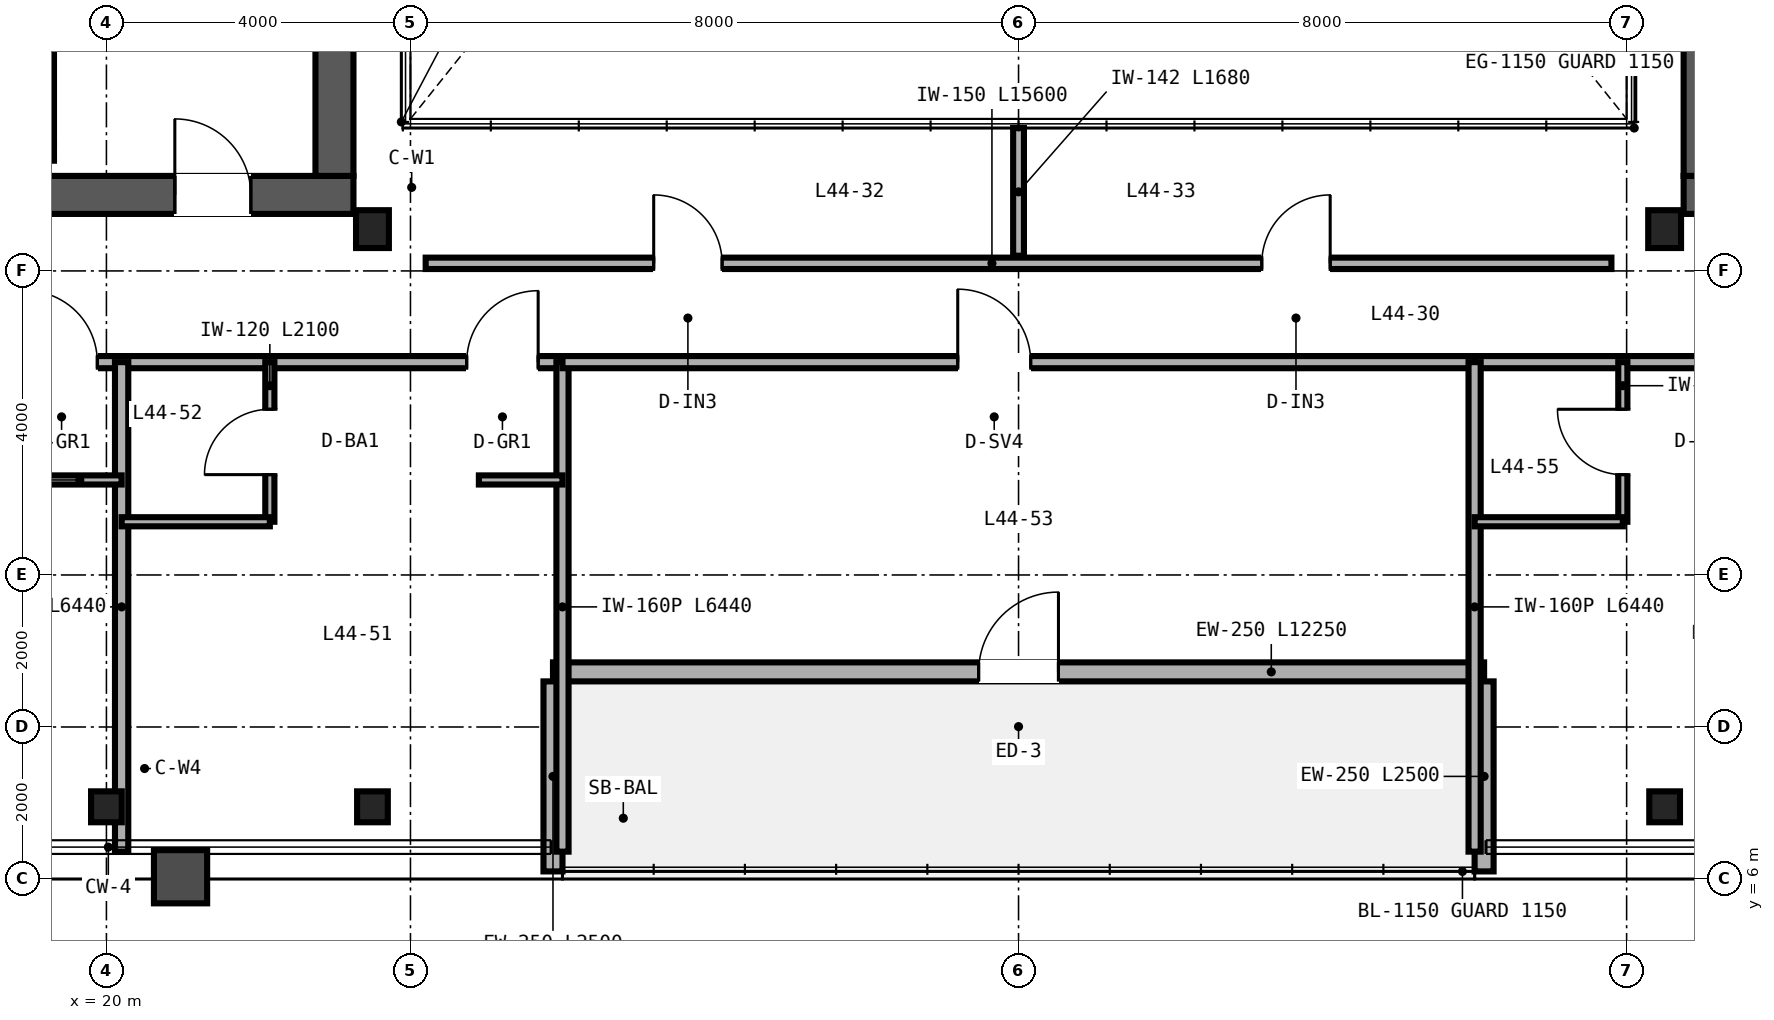
"""IFC4 building model, lengths in metres.
Left out: names, types, materials, properties, quantities, classifications, styles, units other than length and angle.
Written with IfcOpenShell. Run it as: python <this file> out.ifc"""

import sys

from ifc_helpers import new_model, si_unit, direction, frame, frame_2d, origin, origin_2d, place, context, subcontext, project, spatial, rectangle, i_section, extrude, source, transform, mapped, element, fill, save


model = new_model("IFC4")
c1 = context("Model", 3, precision=1e-05, world=origin(), true_north=direction((0.0, 1.0)))
c2 = subcontext(c1, "Body", "Model", "MODEL_VIEW")
j1 = project(units=[si_unit("LENGTHUNIT", "METRE"), si_unit("PLANEANGLEUNIT", "RADIAN")], contexts=[c1])
p1 = place(None, origin())
s1 = spatial("IfcSite", under=j1, at=p1, CompositionType="ELEMENT")
p2 = place(p1, origin())
s2 = spatial("IfcBuilding", under=s1, at=p2, CompositionType="ELEMENT")
p3 = place(p2, frame((0.0, 0.0, 177.6)))
s3 = spatial("IfcBuildingStorey", under=s2, at=p3, CompositionType="ELEMENT", Elevation=177.6)
p4 = place(p3, frame((10.75, 15.0, 0.0), z_axis=(0.0, 0.0, 1.0), x_axis=(1.0, 0.0, 0.0)))
e1 = element("IfcWall", 1, at=p4, inside=s3, PredefinedType="SHEAR", context=c2, shape_type="SweptSolid", body=[
    extrude(rectangle(XDim=12.5, YDim=0.5, at=frame_2d((6.25, 0.0))), origin(), (0.0, 0.0, 1.0), 3.37),
])
p5 = place(p4, frame((10.15, 0.0, 0.0)))
e2 = element("IfcOpeningElement", 2, at=p5, cuts=e1, PredefinedType="OPENING", context=c2, shape_type="SweptSolid", body=[
    extrude(rectangle(XDim=1.0, YDim=2.15, at=frame_2d((0.5, 1.075))), frame((0.0, 0.26, 0.0), z_axis=(0.0, -1.0, 0.0), x_axis=(1.0, 0.0, 0.0)), (0.0, 0.0, 1.0), 0.52),
])
p6 = place(p3, frame((23.0, 15.25, 0.0), z_axis=(0.0, 0.0, 1.0), x_axis=(0.0, 1.0, 0.0)))
e3 = element("IfcWall", 3, at=p6, inside=s3, PredefinedType="SHEAR", context=c2, shape_type="SweptSolid", body=[
    extrude(rectangle(XDim=21.5, YDim=0.5, at=frame_2d((10.75, 0.0))), origin(), (0.0, 0.0, 1.0), 3.37),
])
p7 = place(p3, frame((40.75, 15.0, 0.0), z_axis=(0.0, 0.0, 1.0), x_axis=(1.0, 0.0, 0.0)))
e4 = element("IfcWall", 4, at=p7, inside=s3, PredefinedType="SHEAR", context=c2, shape_type="SweptSolid", body=[
    extrude(rectangle(XDim=12.5, YDim=0.5, at=frame_2d((6.25, 0.0))), origin(), (0.0, 0.0, 1.0), 3.37),
])
p8 = place(p7, frame((4.35, 0.0, 0.0)))
e5 = element("IfcOpeningElement", 5, at=p8, cuts=e4, PredefinedType="OPENING", context=c2, shape_type="SweptSolid", body=[
    extrude(rectangle(XDim=1.0, YDim=2.15, at=frame_2d((0.5, 1.075))), frame((0.0, 0.26, 0.0), z_axis=(0.0, -1.0, 0.0), x_axis=(1.0, 0.0, 0.0)), (0.0, 0.0, 1.0), 0.52),
])
p9 = place(p3, frame((41.0, 15.25, 0.0), z_axis=(0.0, 0.0, 1.0), x_axis=(0.0, 1.0, 0.0)))
e6 = element("IfcWall", 6, at=p9, inside=s3, PredefinedType="SHEAR", context=c2, shape_type="SweptSolid", body=[
    extrude(rectangle(XDim=21.5, YDim=0.5, at=frame_2d((10.75, 0.0))), origin(), (0.0, 0.0, 1.0), 3.37),
])
p10 = place(p3, frame((11.25, 15.56, 0.0), z_axis=(0.0, 0.0, 1.0), x_axis=(1.0, 0.0, 0.0)))
e7 = element("IfcWall", 7, at=p10, inside=s3, PredefinedType="SHEAR", context=c2, shape_type="SweptSolid", body=[
    extrude(rectangle(XDim=8.06, YDim=0.22, at=frame_2d((4.03, 0.0))), origin(), (0.0, 0.0, 1.0), 3.4),
])
p11 = place(p3, frame((19.2, 15.67, 0.0), z_axis=(0.0, 0.0, 1.0), x_axis=(0.0, 1.0, 0.0)))
e8 = element("IfcWall", 8, at=p11, inside=s3, PredefinedType="SHEAR", context=c2, shape_type="SweptSolid", body=[
    extrude(rectangle(XDim=3.28, YDim=0.22, at=frame_2d((1.64, 0.0))), origin(), (0.0, 0.0, 1.0), 3.4),
])
m1 = source(origin(), c2, "Body", "SweptSolid", [
    extrude(i_section(OverallWidth=0.432, OverallDepth=0.498, WebThickness=0.056, FlangeThickness=0.089, FilletRadius=0.025, at=origin_2d()), origin(), (0.0, 0.0, 1.0), 3.37),
])
for number, where, z_axis, x_axis in (
    (9, (23.5, 14.55, 0.0), (0.0, 0.0, 1.0), (1.0, 0.0, 0.0)),
    (10, (40.5, 14.55, 0.0), (0.0, 0.0, 1.0), (1.0, 0.0, 0.0)),
):
    element("IfcColumn", number, at=place(p3, frame(where, z_axis=z_axis, x_axis=x_axis)), inside=s3, PredefinedType="COLUMN", context=c2, shape_type="MappedRepresentation", body=[
        mapped(m1, transform((0.0, 0.0, 0.0), scale=1.0)),
    ])
m2 = source(origin(), c2, "Body", "SweptSolid", [
    extrude(i_section(OverallWidth=0.404, OverallDepth=0.407, WebThickness=0.027, FlangeThickness=0.044, FilletRadius=0.025, at=origin_2d()), origin(), (0.0, 0.0, 1.0), 3.37),
])
for number, where, z_axis, x_axis in (
    (11, (20.0, 6.95, 0.0), (0.0, 0.0, 1.0), (1.0, 0.0, 0.0)),
    (12, (23.5, 6.95, 0.0), (0.0, 0.0, 1.0), (1.0, 0.0, 0.0)),
    (13, (40.5, 6.95, 0.0), (0.0, 0.0, 1.0), (1.0, 0.0, 0.0)),
):
    element("IfcColumn", number, at=place(p3, frame(where, z_axis=z_axis, x_axis=x_axis)), inside=s3, PredefinedType="COLUMN", context=c2, shape_type="MappedRepresentation", body=[
        mapped(m2, transform((0.0, 0.0, 0.0), scale=1.0)),
    ])
p12 = place(p3, frame((25.875, 8.725, 0.0), z_axis=(0.0, 0.0, 1.0), x_axis=(1.0, 0.0, 0.0)))
e14 = element("IfcWall", 14, at=p12, inside=s3, PredefinedType="SOLIDWALL", context=c2, shape_type="SweptSolid", body=[
    extrude(rectangle(XDim=12.25, YDim=0.25, at=frame_2d((6.125, 0.0))), origin(), (0.0, 0.0, 1.0), 3.37),
])
p13 = place(p12, frame((5.6, 0.0, 0.0)))
e15 = element("IfcOpeningElement", 15, at=p13, cuts=e14, PredefinedType="OPENING", context=c2, shape_type="SweptSolid", body=[
    extrude(rectangle(XDim=1.05, YDim=2.15, at=frame_2d((0.525, 1.075))), frame((0.0, 0.135, 0.0), z_axis=(0.0, -1.0, 0.0), x_axis=(1.0, 0.0, 0.0)), (0.0, 0.0, 1.0), 0.27),
])
for number, where, z_axis, x_axis in (
    (16, (25.875, 6.1, 0.0), (0.0, 0.0, 1.0), (0.0, 1.0, 0.0)),
    (17, (38.125, 6.1, 0.0), (0.0, 0.0, 1.0), (0.0, 1.0, 0.0)),
):
    element("IfcWall", number, at=place(p3, frame(where, z_axis=z_axis, x_axis=x_axis)), inside=s3, PredefinedType="SOLIDWALL", context=c2, shape_type="SweptSolid", body=[
        extrude(rectangle(XDim=2.5, YDim=0.25, at=frame_2d((1.25, 0.0))), origin(), (0.0, 0.0, 1.0), 2.443),
    ])
p14 = place(p3, frame((24.2, 14.1, 0.0), z_axis=(0.0, 0.0, 1.0), x_axis=(1.0, 0.0, 0.0)))
e18 = element("IfcWall", 18, at=p14, inside=s3, PredefinedType="PARTITIONING", context=c2, shape_type="SweptSolid", body=[
    extrude(rectangle(XDim=15.6, YDim=0.15, at=frame_2d((7.8, 0.0))), origin(), (0.0, 0.0, 1.0), 3.37),
])
p15 = place(p14, frame((3.0, 0.0, 0.0)))
e19 = element("IfcOpeningElement", 19, at=p15, cuts=e18, PredefinedType="OPENING", context=c2, shape_type="SweptSolid", body=[
    extrude(rectangle(XDim=0.9, YDim=2.15, at=frame_2d((0.45, 1.075))), frame((0.0, 0.085, 0.0), z_axis=(0.0, -1.0, 0.0), x_axis=(1.0, 0.0, 0.0)), (0.0, 0.0, 1.0), 0.17),
])
p16 = place(p14, frame((11.0, 0.0, 0.0)))
e20 = element("IfcOpeningElement", 20, at=p16, cuts=e18, PredefinedType="OPENING", context=c2, shape_type="SweptSolid", body=[
    extrude(rectangle(XDim=0.9, YDim=2.15, at=frame_2d((0.45, 1.075))), frame((0.0, 0.085, 0.0), z_axis=(0.0, -1.0, 0.0), x_axis=(1.0, 0.0, 0.0)), (0.0, 0.0, 1.0), 0.17),
])
p17 = place(p3, frame((32.0, 14.2, 0.0), z_axis=(0.0, 0.0, 1.0), x_axis=(0.0, 1.0, 0.0)))
e21 = element("IfcWall", 21, at=p17, inside=s3, PredefinedType="PARTITIONING", context=c2, shape_type="SweptSolid", body=[
    extrude(rectangle(XDim=1.68, YDim=0.142, at=frame_2d((0.84, 0.0))), origin(), (0.0, 0.0, 1.0), 3.37),
])
p18 = place(p3, frame((14.0, 12.8, 0.0), z_axis=(0.0, 0.0, 1.0), x_axis=(1.0, 0.0, 0.0)))
e22 = element("IfcWall", 22, at=p18, inside=s3, PredefinedType="PARTITIONING", context=c2, shape_type="SweptSolid", body=[
    extrude(rectangle(XDim=12.0, YDim=0.16, at=frame_2d((6.0, 0.0))), origin(), (0.0, 0.0, 1.0), 2.913),
])
p19 = place(p18, frame((4.94, 0.0, 0.0)))
e23 = element("IfcOpeningElement", 23, at=p19, cuts=e22, PredefinedType="OPENING", context=c2, shape_type="SweptSolid", body=[
    extrude(rectangle(XDim=0.94, YDim=2.15, at=frame_2d((0.47, 1.075))), frame((0.0, 0.09, 0.0), z_axis=(0.0, -1.0, 0.0), x_axis=(1.0, 0.0, 0.0)), (0.0, 0.0, 1.0), 0.18),
])
p20 = place(p18, frame((10.74, 0.0, 0.0)))
e24 = element("IfcOpeningElement", 24, at=p20, cuts=e22, PredefinedType="OPENING", context=c2, shape_type="SweptSolid", body=[
    extrude(rectangle(XDim=0.94, YDim=2.15, at=frame_2d((0.47, 1.075))), frame((0.0, 0.09, 0.0), z_axis=(0.0, -1.0, 0.0), x_axis=(1.0, 0.0, 0.0)), (0.0, 0.0, 1.0), 0.18),
])
p21 = place(p3, frame((26.0, 6.36, 0.0), z_axis=(0.0, 0.0, 1.0), x_axis=(0.0, 1.0, 0.0)))
e25 = element("IfcWall", 25, at=p21, inside=s3, PredefinedType="PARTITIONING", context=c2, shape_type="SweptSolid", body=[
    extrude(rectangle(XDim=6.44, YDim=0.16, at=frame_2d((3.22, 0.0))), origin(), (0.0, 0.0, 1.0), 2.443),
])
p22 = place(p3, frame((20.2, 6.36, 0.0), z_axis=(0.0, 0.0, 1.0), x_axis=(0.0, 1.0, 0.0)))
e26 = element("IfcWall", 26, at=p22, inside=s3, PredefinedType="PARTITIONING", context=c2, shape_type="SweptSolid", body=[
    extrude(rectangle(XDim=6.44, YDim=0.175, at=frame_2d((3.22, 0.0))), origin(), (0.0, 0.0, 1.0), 2.677),
])
p23 = place(p3, frame((19.1, 11.25, 0.0), z_axis=(0.0, 0.0, 1.0), x_axis=(1.0, 0.0, 0.0)))
e27 = element("IfcWall", 27, at=p23, inside=s3, PredefinedType="PARTITIONING", context=c2, shape_type="SweptSolid", body=[
    extrude(rectangle(XDim=1.1, YDim=0.12, at=frame_2d((0.55, 0.0))), origin(), (0.0, 0.0, 1.0), 3.37),
])
p24 = place(p3, frame((22.15, 10.7, 0.0), z_axis=(0.0, 0.0, 1.0), x_axis=(0.0, 1.0, 0.0)))
e28 = element("IfcWall", 28, at=p24, inside=s3, PredefinedType="PARTITIONING", context=c2, shape_type="SweptSolid", body=[
    extrude(rectangle(XDim=2.1, YDim=0.12, at=frame_2d((1.05, 0.0))), origin(), (0.0, 0.0, 1.0), 3.37),
])
p25 = place(p24, frame((0.62, 0.0, 0.0)))
e29 = element("IfcOpeningElement", 29, at=p25, cuts=e28, PredefinedType="OPENING", context=c2, shape_type="SweptSolid", body=[
    extrude(rectangle(XDim=0.86, YDim=2.1, at=frame_2d((0.43, 1.05))), frame((0.0, 0.07, 0.0), z_axis=(0.0, -1.0, 0.0), x_axis=(1.0, 0.0, 0.0)), (0.0, 0.0, 1.0), 0.14),
])
p26 = place(p3, frame((20.2, 10.7, 0.0), z_axis=(0.0, 0.0, 1.0), x_axis=(1.0, 0.0, 0.0)))
e30 = element("IfcWall", 30, at=p26, inside=s3, PredefinedType="PARTITIONING", context=c2, shape_type="SweptSolid", body=[
    extrude(rectangle(XDim=1.95, YDim=0.12, at=frame_2d((0.975, 0.0))), origin(), (0.0, 0.0, 1.0), 3.37),
])
p27 = place(p3, frame((24.9, 11.25, 0.0), z_axis=(0.0, 0.0, 1.0), x_axis=(1.0, 0.0, 0.0)))
e31 = element("IfcWall", 31, at=p27, inside=s3, PredefinedType="PARTITIONING", context=c2, shape_type="SweptSolid", body=[
    extrude(rectangle(XDim=1.1, YDim=0.12, at=frame_2d((0.55, 0.0))), origin(), (0.0, 0.0, 1.0), 3.37),
])
p28 = place(p3, frame((26.0, 12.8, 0.0), z_axis=(0.0, 0.0, 1.0), x_axis=(1.0, 0.0, 0.0)))
e32 = element("IfcWall", 32, at=p28, inside=s3, PredefinedType="PARTITIONING", context=c2, shape_type="SweptSolid", body=[
    extrude(rectangle(XDim=12.0, YDim=0.16, at=frame_2d((6.0, 0.0))), origin(), (0.0, 0.0, 1.0), 3.37),
])
p29 = place(p28, frame((5.2, 0.0, 0.0)))
e33 = element("IfcOpeningElement", 33, at=p29, cuts=e32, PredefinedType="OPENING", context=c2, shape_type="SweptSolid", body=[
    extrude(rectangle(XDim=0.96, YDim=2.15, at=frame_2d((0.48, 1.075))), frame((0.0, 0.09, 0.0), z_axis=(0.0, -1.0, 0.0), x_axis=(1.0, 0.0, 0.0)), (0.0, 0.0, 1.0), 0.18),
])
p30 = place(p3, frame((38.0, 12.8, 0.0), z_axis=(0.0, 0.0, 1.0), x_axis=(1.0, 0.0, 0.0)))
e34 = element("IfcWall", 34, at=p30, inside=s3, PredefinedType="PARTITIONING", context=c2, shape_type="SweptSolid", body=[
    extrude(rectangle(XDim=12.0, YDim=0.16, at=frame_2d((6.0, 0.0))), origin(), (0.0, 0.0, 1.0), 2.913),
])
p31 = place(p30, frame((4.94, 0.0, 0.0)))
e35 = element("IfcOpeningElement", 35, at=p31, cuts=e34, PredefinedType="OPENING", context=c2, shape_type="SweptSolid", body=[
    extrude(rectangle(XDim=0.94, YDim=2.15, at=frame_2d((0.47, 1.075))), frame((0.0, 0.09, 0.0), z_axis=(0.0, -1.0, 0.0), x_axis=(1.0, 0.0, 0.0)), (0.0, 0.0, 1.0), 0.18),
])
p32 = place(p30, frame((10.74, 0.0, 0.0)))
e36 = element("IfcOpeningElement", 36, at=p32, cuts=e34, PredefinedType="OPENING", context=c2, shape_type="SweptSolid", body=[
    extrude(rectangle(XDim=0.94, YDim=2.15, at=frame_2d((0.47, 1.075))), frame((0.0, 0.09, 0.0), z_axis=(0.0, -1.0, 0.0), x_axis=(1.0, 0.0, 0.0)), (0.0, 0.0, 1.0), 0.18),
])
p33 = place(p3, frame((38.0, 6.36, 0.0), z_axis=(0.0, 0.0, 1.0), x_axis=(0.0, 1.0, 0.0)))
e37 = element("IfcWall", 37, at=p33, inside=s3, PredefinedType="PARTITIONING", context=c2, shape_type="SweptSolid", body=[
    extrude(rectangle(XDim=6.44, YDim=0.16, at=frame_2d((3.22, 0.0))), origin(), (0.0, 0.0, 1.0), 2.443),
])
p34 = place(p3, frame((39.95, 10.7, 0.0), z_axis=(0.0, 0.0, 1.0), x_axis=(0.0, 1.0, 0.0)))
e38 = element("IfcWall", 38, at=p34, inside=s3, PredefinedType="PARTITIONING", context=c2, shape_type="SweptSolid", body=[
    extrude(rectangle(XDim=2.1, YDim=0.12, at=frame_2d((1.05, 0.0))), origin(), (0.0, 0.0, 1.0), 3.37),
])
p35 = place(p34, frame((0.62, 0.0, 0.0)))
e39 = element("IfcOpeningElement", 39, at=p35, cuts=e38, PredefinedType="OPENING", context=c2, shape_type="SweptSolid", body=[
    extrude(rectangle(XDim=0.86, YDim=2.1, at=frame_2d((0.43, 1.05))), frame((0.0, 0.07, 0.0), z_axis=(0.0, -1.0, 0.0), x_axis=(1.0, 0.0, 0.0)), (0.0, 0.0, 1.0), 0.14),
])
p36 = place(p3, frame((38.0, 10.7, 0.0), z_axis=(0.0, 0.0, 1.0), x_axis=(1.0, 0.0, 0.0)))
e40 = element("IfcWall", 40, at=p36, inside=s3, PredefinedType="PARTITIONING", context=c2, shape_type="SweptSolid", body=[
    extrude(rectangle(XDim=1.95, YDim=0.12, at=frame_2d((0.975, 0.0))), origin(), (0.0, 0.0, 1.0), 3.37),
])
m3 = source(origin(), c2, "Body", "SweptSolid", [
    extrude(rectangle(XDim=1.05, YDim=2.15, at=frame_2d((0.525, 1.075))), frame((0.0, 0.025, 0.0), z_axis=(0.0, -1.0, 0.0), x_axis=(1.0, 0.0, 0.0)), (0.0, 0.0, 1.0), 0.05),
])
p37 = place(p13, origin())
e41 = element("IfcDoor", 41, at=p37, inside=s3, OperationType="SINGLE_SWING_RIGHT", PredefinedType="DOOR", context=c2, shape_type="MappedRepresentation", body=[
    mapped(m3, transform((0.0, 0.0, 0.0), scale=1.0)),
])
fill(e15, e41)
m4 = source(origin(), c2, "Body", "SweptSolid", [
    extrude(rectangle(XDim=1.0, YDim=2.15, at=frame_2d((0.5, 1.075))), frame((0.0, 0.025, 0.0), z_axis=(0.0, -1.0, 0.0), x_axis=(1.0, 0.0, 0.0)), (0.0, 0.0, 1.0), 0.05),
])
p38 = place(p5, origin())
e42 = element("IfcDoor", 42, at=p38, inside=s3, OperationType="SINGLE_SWING_LEFT", PredefinedType="DOOR", context=c2, shape_type="MappedRepresentation", body=[
    mapped(m4, transform((0.0, 0.0, 0.0), scale=1.0)),
])
fill(e2, e42)
m5 = source(origin(), c2, "Body", "SweptSolid", [
    extrude(rectangle(XDim=0.9, YDim=2.15, at=frame_2d((0.45, 1.075))), frame((0.0, 0.025, 0.0), z_axis=(0.0, -1.0, 0.0), x_axis=(1.0, 0.0, 0.0)), (0.0, 0.0, 1.0), 0.05),
])
p39 = place(p15, origin())
e43 = element("IfcDoor", 43, at=p39, inside=s3, OperationType="SINGLE_SWING_LEFT", PredefinedType="DOOR", context=c2, shape_type="MappedRepresentation", body=[
    mapped(m5, transform((0.0, 0.0, 0.0), scale=1.0)),
])
fill(e19, e43)
p40 = place(p16, origin())
e44 = element("IfcDoor", 44, at=p40, inside=s3, OperationType="SINGLE_SWING_RIGHT", PredefinedType="DOOR", context=c2, shape_type="MappedRepresentation", body=[
    mapped(m5, transform((0.0, 0.0, 0.0), scale=1.0)),
])
fill(e20, e44)
m6 = source(origin(), c2, "Body", "SweptSolid", [
    extrude(rectangle(XDim=0.86, YDim=2.1, at=frame_2d((0.43, 1.05))), frame((0.0, 0.025, 0.0), z_axis=(0.0, -1.0, 0.0), x_axis=(1.0, 0.0, 0.0)), (0.0, 0.0, 1.0), 0.05),
])
p41 = place(p25, origin())
e45 = element("IfcDoor", 45, at=p41, inside=s3, OperationType="SINGLE_SWING_LEFT", PredefinedType="DOOR", context=c2, shape_type="MappedRepresentation", body=[
    mapped(m6, transform((0.0, 0.0, 0.0), scale=1.0)),
])
fill(e29, e45)
m7 = source(origin(), c2, "Body", "SweptSolid", [
    extrude(rectangle(XDim=0.94, YDim=2.15, at=frame_2d((0.47, 1.075))), frame((0.0, 0.025, 0.0), z_axis=(0.0, -1.0, 0.0), x_axis=(1.0, 0.0, 0.0)), (0.0, 0.0, 1.0), 0.05),
])
p42 = place(p19, origin())
e46 = element("IfcDoor", 46, at=p42, inside=s3, OperationType="SINGLE_SWING_LEFT", PredefinedType="DOOR", context=c2, shape_type="MappedRepresentation", body=[
    mapped(m7, transform((0.0, 0.0, 0.0), scale=1.0)),
])
fill(e23, e46)
p43 = place(p20, origin())
e47 = element("IfcDoor", 47, at=p43, inside=s3, OperationType="SINGLE_SWING_RIGHT", PredefinedType="DOOR", context=c2, shape_type="MappedRepresentation", body=[
    mapped(m7, transform((0.0, 0.0, 0.0), scale=1.0)),
])
fill(e24, e47)
m8 = source(origin(), c2, "Body", "SweptSolid", [
    extrude(rectangle(XDim=0.96, YDim=2.15, at=frame_2d((0.48, 1.075))), frame((0.0, 0.025, 0.0), z_axis=(0.0, -1.0, 0.0), x_axis=(1.0, 0.0, 0.0)), (0.0, 0.0, 1.0), 0.05),
])
p44 = place(p29, origin())
e48 = element("IfcDoor", 48, at=p44, inside=s3, OperationType="SINGLE_SWING_LEFT", PredefinedType="DOOR", context=c2, shape_type="MappedRepresentation", body=[
    mapped(m8, transform((0.0, 0.0, 0.0), scale=1.0)),
])
fill(e33, e48)
p45 = place(p35, origin())
e49 = element("IfcDoor", 49, at=p45, inside=s3, OperationType="SINGLE_SWING_RIGHT", PredefinedType="DOOR", context=c2, shape_type="MappedRepresentation", body=[
    mapped(m6, transform((0.0, 0.0, 0.0), scale=1.0)),
])
fill(e39, e49)
save(model, sys.argv[1])
